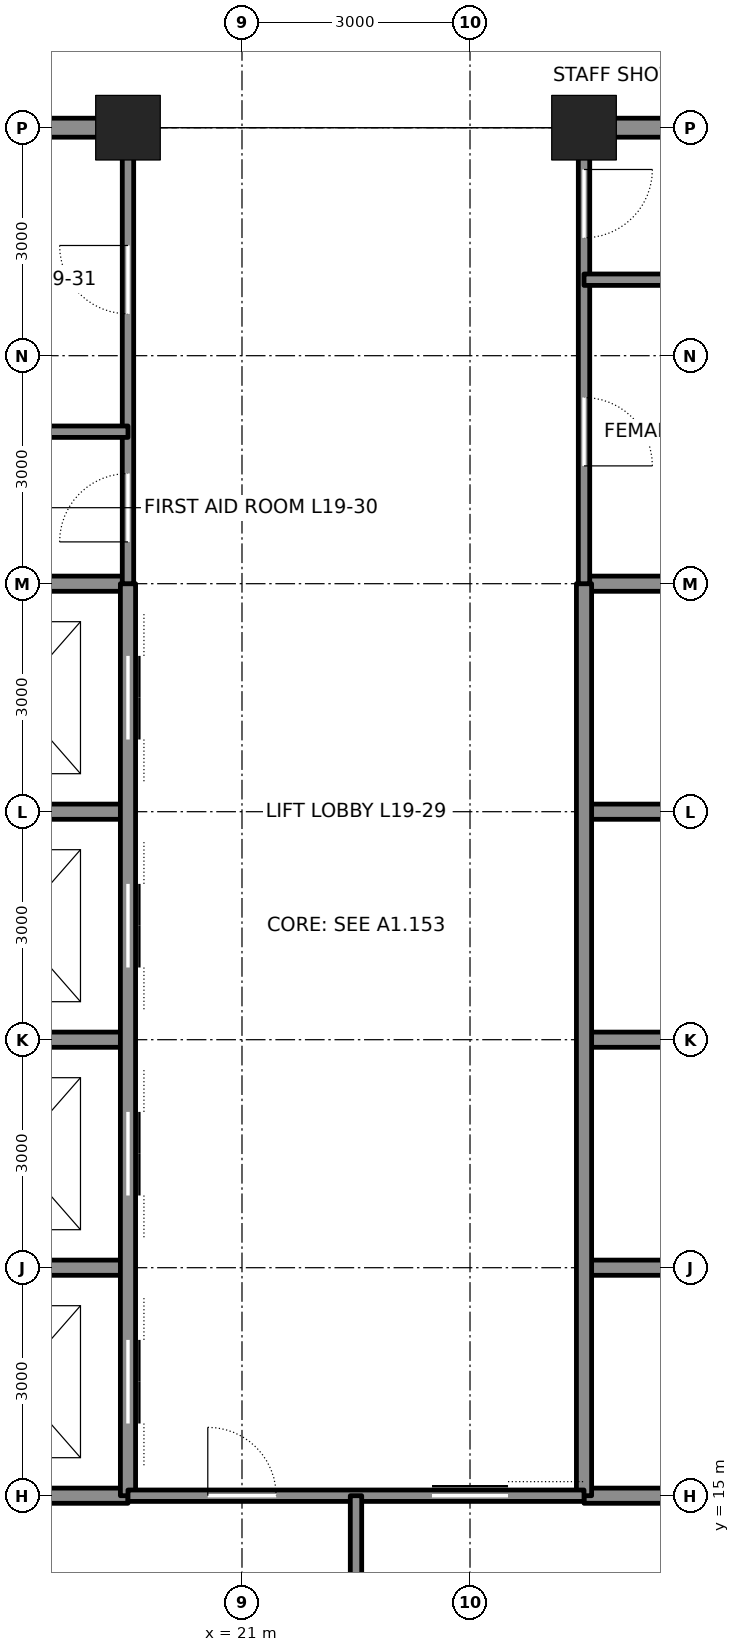
"""IFC4 building model, lengths in metres.
Left out: names, types, materials, properties, quantities, classifications, styles, units other than length and angle.
Written with IfcOpenShell. Run it as: python <this file> out.ifc"""

import sys

from ifc_helpers import new_model, si_unit, direction, frame, frame_2d, origin, origin_2d, place, context, subcontext, project, spatial, rectangle, hollow_rectangle, extrude, element, fill, save


model = new_model("IFC4")
c1 = context("Model", 3, precision=1e-05, world=origin(), true_north=direction((0.0, 1.0)))
c2 = subcontext(c1, "Body", "Model", "MODEL_VIEW")
j1 = project(units=[si_unit("LENGTHUNIT", "METRE"), si_unit("PLANEANGLEUNIT", "RADIAN")], contexts=[c1])
p1 = place(None, origin())
s1 = spatial("IfcSite", under=j1, at=p1, CompositionType="ELEMENT")
p2 = place(p1, origin())
s2 = spatial("IfcBuilding", under=s1, at=p2, CompositionType="ELEMENT")
p3 = place(p2, frame((0.0, 0.0, 91.8)))
s3 = spatial("IfcBuildingStorey", under=s2, at=p3, CompositionType="ELEMENT", Elevation=91.8)
for number, where, z_axis, x_axis in (
    (1, (19.5, 33.0, 0.0), (0.0, 0.0, 1.0), (1.0, 0.0, 0.0)),
    (2, (25.5, 33.0, 0.0), (0.0, 0.0, 1.0), (1.0, 0.0, 0.0)),
):
    element("IfcColumn", number, at=place(p3, frame(where, z_axis=z_axis, x_axis=x_axis)), inside=s3, PredefinedType="COLUMN", context=c2, shape_type="SweptSolid", body=[
        extrude(hollow_rectangle(XDim=0.85, YDim=0.85, WallThickness=0.085, at=origin_2d()), origin(), (0.0, 0.0, 1.0), 4.5),
    ])
for number, where, z_axis, x_axis in (
    (3, (12.0, 15.0, 0.0), (0.0, 0.0, 1.0), (1.0, 0.0, 0.0)),
    (4, (25.5, 15.0, 0.0), (0.0, 0.0, 1.0), (1.0, 0.0, 0.0)),
):
    element("IfcWall", number, at=place(p3, frame(where, z_axis=z_axis, x_axis=x_axis)), inside=s3, PredefinedType="SOLIDWALL", context=c2, shape_type="SweptSolid", body=[
        extrude(rectangle(XDim=7.5, YDim=0.2, at=frame_2d((3.75, 0.0))), origin(), (0.0, 0.0, 1.0), 4.34),
    ])
for number, where, z_axis, x_axis in (
    (5, (16.75, 24.0, 0.0), (0.0, 0.0, 1.0), (1.0, 0.0, 0.0)),
    (6, (25.5, 24.0, 0.0), (0.0, 0.0, 1.0), (1.0, 0.0, 0.0)),
):
    element("IfcWall", number, at=place(p3, frame(where, z_axis=z_axis, x_axis=x_axis)), inside=s3, PredefinedType="SOLIDWALL", context=c2, shape_type="SweptSolid", body=[
        extrude(rectangle(XDim=2.75, YDim=0.2, at=frame_2d((1.375, 0.0))), origin(), (0.0, 0.0, 1.0), 3.39),
    ])
p4 = place(p3, frame((12.0, 27.0, 0.0), z_axis=(0.0, 0.0, 1.0), x_axis=(1.0, 0.0, 0.0)))
e7 = element("IfcWall", 7, at=p4, inside=s3, PredefinedType="SOLIDWALL", context=c2, shape_type="SweptSolid", body=[
    extrude(rectangle(XDim=7.5, YDim=0.2, at=frame_2d((3.75, 0.0))), origin(), (0.0, 0.0, 1.0), 4.34),
])
p5 = place(p4, frame((1.65, 0.0, 0.0)))
e8 = element("IfcOpeningElement", 8, at=p5, cuts=e7, PredefinedType="OPENING", context=c2, shape_type="SweptSolid", body=[
    extrude(rectangle(XDim=1.2, YDim=2.1, at=frame_2d((0.6, 1.05))), frame((0.0, 0.11, 0.0), z_axis=(0.0, -1.0, 0.0), x_axis=(1.0, 0.0, 0.0)), (0.0, 0.0, 1.0), 0.22),
])
p6 = place(p3, frame((25.5, 27.0, 0.0), z_axis=(0.0, 0.0, 1.0), x_axis=(1.0, 0.0, 0.0)))
e9 = element("IfcWall", 9, at=p6, inside=s3, PredefinedType="SOLIDWALL", context=c2, shape_type="SweptSolid", body=[
    extrude(rectangle(XDim=3.0, YDim=0.2, at=frame_2d((1.5, 0.0))), origin(), (0.0, 0.0, 1.0), 4.34),
])
for number, where, z_axis, x_axis in (
    (10, (16.75, 33.0, 0.0), (0.0, 0.0, 1.0), (1.0, 0.0, 0.0)),
    (11, (25.75, 33.0, 0.0), (0.0, 0.0, 1.0), (1.0, 0.0, 0.0)),
):
    element("IfcWall", number, at=place(p3, frame(where, z_axis=z_axis, x_axis=x_axis)), inside=s3, PredefinedType="SOLIDWALL", context=c2, shape_type="SweptSolid", body=[
        extrude(rectangle(XDim=2.5, YDim=0.25, at=frame_2d((1.25, 0.0))), origin(), (0.0, 0.0, 1.0), 3.481),
    ])
p7 = place(p3, frame((16.5, 18.0, 0.0), z_axis=(0.0, 0.0, 1.0), x_axis=(1.0, 0.0, 0.0)))
e12 = element("IfcWall", 12, at=p7, inside=s3, PredefinedType="SOLIDWALL", context=c2, shape_type="SweptSolid", body=[
    extrude(rectangle(XDim=3.0, YDim=0.2, at=frame_2d((1.5, 0.0))), origin(), (0.0, 0.0, 1.0), 4.34),
])
p8 = place(p3, frame((25.5, 18.0, 0.0), z_axis=(0.0, 0.0, 1.0), x_axis=(1.0, 0.0, 0.0)))
e13 = element("IfcWall", 13, at=p8, inside=s3, PredefinedType="SOLIDWALL", context=c2, shape_type="SweptSolid", body=[
    extrude(rectangle(XDim=7.5, YDim=0.2, at=frame_2d((3.75, 0.0))), origin(), (0.0, 0.0, 1.0), 4.34),
])
p9 = place(p8, frame((4.65, 0.0, 0.0)))
e14 = element("IfcOpeningElement", 14, at=p9, cuts=e13, PredefinedType="OPENING", context=c2, shape_type="SweptSolid", body=[
    extrude(rectangle(XDim=1.2, YDim=2.1, at=frame_2d((0.6, 1.05))), frame((0.0, 0.11, 0.0), z_axis=(0.0, -1.0, 0.0), x_axis=(1.0, 0.0, 0.0)), (0.0, 0.0, 1.0), 0.22),
])
for number, where, z_axis, x_axis in (
    (15, (16.75, 21.0, 0.0), (0.0, 0.0, 1.0), (1.0, 0.0, 0.0)),
    (16, (25.5, 21.0, 0.0), (0.0, 0.0, 1.0), (1.0, 0.0, 0.0)),
):
    element("IfcWall", number, at=place(p3, frame(where, z_axis=z_axis, x_axis=x_axis)), inside=s3, PredefinedType="SOLIDWALL", context=c2, shape_type="SweptSolid", body=[
        extrude(rectangle(XDim=2.75, YDim=0.2, at=frame_2d((1.375, 0.0))), origin(), (0.0, 0.0, 1.0), 3.39),
    ])
p10 = place(p3, frame((19.5, 15.0, 0.0), z_axis=(0.0, 0.0, 1.0), x_axis=(0.0, 1.0, 0.0)))
e17 = element("IfcWall", 17, at=p10, inside=s3, PredefinedType="SOLIDWALL", context=c2, shape_type="SweptSolid", body=[
    extrude(rectangle(XDim=12.0, YDim=0.2, at=frame_2d((6.0, 0.0))), origin(), (0.0, 0.0, 1.0), 3.365),
])
p11 = place(p10, frame((0.95, 0.0, 0.0)))
e18 = element("IfcOpeningElement", 18, at=p11, cuts=e17, PredefinedType="OPENING", context=c2, shape_type="SweptSolid", body=[
    extrude(rectangle(XDim=1.1, YDim=2.1, at=frame_2d((0.55, 1.05))), frame((0.0, 0.11, 0.0), z_axis=(0.0, -1.0, 0.0), x_axis=(1.0, 0.0, 0.0)), (0.0, 0.0, 1.0), 0.22),
])
p12 = place(p10, frame((3.95, 0.0, 0.0)))
e19 = element("IfcOpeningElement", 19, at=p12, cuts=e17, PredefinedType="OPENING", context=c2, shape_type="SweptSolid", body=[
    extrude(rectangle(XDim=1.1, YDim=2.1, at=frame_2d((0.55, 1.05))), frame((0.0, 0.11, 0.0), z_axis=(0.0, -1.0, 0.0), x_axis=(1.0, 0.0, 0.0)), (0.0, 0.0, 1.0), 0.22),
])
p13 = place(p10, frame((6.95, 0.0, 0.0)))
e20 = element("IfcOpeningElement", 20, at=p13, cuts=e17, PredefinedType="OPENING", context=c2, shape_type="SweptSolid", body=[
    extrude(rectangle(XDim=1.1, YDim=2.1, at=frame_2d((0.55, 1.05))), frame((0.0, 0.11, 0.0), z_axis=(0.0, -1.0, 0.0), x_axis=(1.0, 0.0, 0.0)), (0.0, 0.0, 1.0), 0.22),
])
p14 = place(p10, frame((9.95, 0.0, 0.0)))
e21 = element("IfcOpeningElement", 21, at=p14, cuts=e17, PredefinedType="OPENING", context=c2, shape_type="SweptSolid", body=[
    extrude(rectangle(XDim=1.1, YDim=2.1, at=frame_2d((0.55, 1.05))), frame((0.0, 0.11, 0.0), z_axis=(0.0, -1.0, 0.0), x_axis=(1.0, 0.0, 0.0)), (0.0, 0.0, 1.0), 0.22),
])
p15 = place(p3, frame((19.5, 27.0, 0.0), z_axis=(0.0, 0.0, 1.0), x_axis=(0.0, 1.0, 0.0)))
e22 = element("IfcWall", 22, at=p15, inside=s3, PredefinedType="PARTITIONING", context=c2, shape_type="SweptSolid", body=[
    extrude(rectangle(XDim=5.75, YDim=0.15, at=frame_2d((2.875, 0.0))), origin(), (0.0, 0.0, 1.0), 3.365),
])
p16 = place(p15, frame((0.55, 0.0, 0.0)))
e23 = element("IfcOpeningElement", 23, at=p16, cuts=e22, PredefinedType="OPENING", context=c2, shape_type="SweptSolid", body=[
    extrude(rectangle(XDim=0.9, YDim=2.1, at=frame_2d((0.45, 1.05))), frame((0.0, 0.085, 0.0), z_axis=(0.0, -1.0, 0.0), x_axis=(1.0, 0.0, 0.0)), (0.0, 0.0, 1.0), 0.17),
])
p17 = place(p15, frame((3.55, 0.0, 0.0)))
e24 = element("IfcOpeningElement", 24, at=p17, cuts=e22, PredefinedType="OPENING", context=c2, shape_type="SweptSolid", body=[
    extrude(rectangle(XDim=0.9, YDim=2.1, at=frame_2d((0.45, 1.05))), frame((0.0, 0.085, 0.0), z_axis=(0.0, -1.0, 0.0), x_axis=(1.0, 0.0, 0.0)), (0.0, 0.0, 1.0), 0.17),
])
p18 = place(p3, frame((25.5, 15.0, 0.0), z_axis=(0.0, 0.0, 1.0), x_axis=(0.0, 1.0, 0.0)))
e25 = element("IfcWall", 25, at=p18, inside=s3, PredefinedType="SOLIDWALL", context=c2, shape_type="SweptSolid", body=[
    extrude(rectangle(XDim=12.0, YDim=0.2, at=frame_2d((6.0, 0.0))), origin(), (0.0, 0.0, 1.0), 3.365),
])
p19 = place(p3, frame((25.5, 27.0, 0.0), z_axis=(0.0, 0.0, 1.0), x_axis=(0.0, 1.0, 0.0)))
e26 = element("IfcWall", 26, at=p19, inside=s3, PredefinedType="PARTITIONING", context=c2, shape_type="SweptSolid", body=[
    extrude(rectangle(XDim=5.75, YDim=0.15, at=frame_2d((2.875, 0.0))), origin(), (0.0, 0.0, 1.0), 3.365),
])
p20 = place(p19, frame((1.55, 0.0, 0.0)))
e27 = element("IfcOpeningElement", 27, at=p20, cuts=e26, PredefinedType="OPENING", context=c2, shape_type="SweptSolid", body=[
    extrude(rectangle(XDim=0.9, YDim=2.1, at=frame_2d((0.45, 1.05))), frame((0.0, 0.085, 0.0), z_axis=(0.0, -1.0, 0.0), x_axis=(1.0, 0.0, 0.0)), (0.0, 0.0, 1.0), 0.17),
])
p21 = place(p19, frame((4.55, 0.0, 0.0)))
e28 = element("IfcOpeningElement", 28, at=p21, cuts=e26, PredefinedType="OPENING", context=c2, shape_type="SweptSolid", body=[
    extrude(rectangle(XDim=0.9, YDim=2.1, at=frame_2d((0.45, 1.05))), frame((0.0, 0.085, 0.0), z_axis=(0.0, -1.0, 0.0), x_axis=(1.0, 0.0, 0.0)), (0.0, 0.0, 1.0), 0.17),
])
p22 = place(p3, frame((19.5, 15.0, 0.0), z_axis=(0.0, 0.0, 1.0), x_axis=(1.0, 0.0, 0.0)))
e29 = element("IfcWall", 29, at=p22, inside=s3, PredefinedType="PARTITIONING", context=c2, shape_type="SweptSolid", body=[
    extrude(rectangle(XDim=6.0, YDim=0.15, at=frame_2d((3.0, 0.0))), origin(), (0.0, 0.0, 1.0), 4.34),
])
p23 = place(p22, frame((4.0, 0.0, 0.0)))
e30 = element("IfcOpeningElement", 30, at=p23, cuts=e29, PredefinedType="OPENING", context=c2, shape_type="SweptSolid", body=[
    extrude(rectangle(XDim=1.0, YDim=2.1, at=frame_2d((0.5, 1.05))), frame((0.0, 0.085, 0.0), z_axis=(0.0, -1.0, 0.0), x_axis=(1.0, 0.0, 0.0)), (0.0, 0.0, 1.0), 0.17),
])
p24 = place(p22, frame((1.05, 0.0, 0.0)))
e31 = element("IfcOpeningElement", 31, at=p24, cuts=e29, PredefinedType="OPENING", context=c2, shape_type="SweptSolid", body=[
    extrude(rectangle(XDim=0.9, YDim=2.1, at=frame_2d((0.45, 1.05))), frame((0.0, 0.085, 0.0), z_axis=(0.0, -1.0, 0.0), x_axis=(1.0, 0.0, 0.0)), (0.0, 0.0, 1.0), 0.17),
])
for number, where, z_axis, x_axis in (
    (32, (22.5, 15.0, 0.0), (0.0, 0.0, 1.0), (0.0, -1.0, 0.0)),
    (33, (16.5, 29.0, 0.0), (0.0, 0.0, 1.0), (1.0, 0.0, 0.0)),
    (34, (25.5, 31.0, 0.0), (0.0, 0.0, 1.0), (1.0, 0.0, 0.0)),
):
    element("IfcWall", number, at=place(p3, frame(where, z_axis=z_axis, x_axis=x_axis)), inside=s3, PredefinedType="PARTITIONING", context=c2, shape_type="SweptSolid", body=[
        extrude(rectangle(XDim=3.0, YDim=0.15, at=frame_2d((1.5, 0.0))), origin(), (0.0, 0.0, 1.0), 4.34),
    ])
p25 = place(p16, origin())
e35 = element("IfcDoor", 35, at=p25, inside=s3, OperationType="SINGLE_SWING_LEFT", PredefinedType="DOOR", context=c2, shape_type="SweptSolid", body=[
    extrude(rectangle(XDim=0.9, YDim=2.1, at=frame_2d((0.45, 1.05))), frame((0.0, 0.025, 0.0), z_axis=(0.0, -1.0, 0.0), x_axis=(1.0, 0.0, 0.0)), (0.0, 0.0, 1.0), 0.05),
])
fill(e23, e35)
p26 = place(p17, origin())
e36 = element("IfcDoor", 36, at=p26, inside=s3, OperationType="SINGLE_SWING_RIGHT", PredefinedType="DOOR", context=c2, shape_type="SweptSolid", body=[
    extrude(rectangle(XDim=0.9, YDim=2.1, at=frame_2d((0.45, 1.05))), frame((0.0, 0.025, 0.0), z_axis=(0.0, -1.0, 0.0), x_axis=(1.0, 0.0, 0.0)), (0.0, 0.0, 1.0), 0.05),
])
fill(e24, e36)
p27 = place(p20, frame((0.9, 0.0, 0.0), z_axis=(0.0, 0.0, 1.0), x_axis=(-1.0, 0.0, 0.0)))
e37 = element("IfcDoor", 37, at=p27, inside=s3, OperationType="SINGLE_SWING_RIGHT", PredefinedType="DOOR", context=c2, shape_type="SweptSolid", body=[
    extrude(rectangle(XDim=0.9, YDim=2.1, at=frame_2d((0.45, 1.05))), frame((0.0, 0.025, 0.0), z_axis=(0.0, -1.0, 0.0), x_axis=(1.0, 0.0, 0.0)), (0.0, 0.0, 1.0), 0.05),
])
fill(e27, e37)
p28 = place(p21, frame((0.9, 0.0, 0.0), z_axis=(0.0, 0.0, 1.0), x_axis=(-1.0, 0.0, 0.0)))
e38 = element("IfcDoor", 38, at=p28, inside=s3, OperationType="SINGLE_SWING_LEFT", PredefinedType="DOOR", context=c2, shape_type="SweptSolid", body=[
    extrude(rectangle(XDim=0.9, YDim=2.1, at=frame_2d((0.45, 1.05))), frame((0.0, 0.025, 0.0), z_axis=(0.0, -1.0, 0.0), x_axis=(1.0, 0.0, 0.0)), (0.0, 0.0, 1.0), 0.05),
])
fill(e28, e38)
p29 = place(p23, origin())
e39 = element("IfcDoor", 39, at=p29, inside=s3, OperationType="SLIDING_TO_LEFT", PredefinedType="DOOR", context=c2, shape_type="SweptSolid", body=[
    extrude(rectangle(XDim=1.0, YDim=2.1, at=frame_2d((0.5, 1.05))), frame((0.0, 0.025, 0.0), z_axis=(0.0, -1.0, 0.0), x_axis=(1.0, 0.0, 0.0)), (0.0, 0.0, 1.0), 0.05),
])
fill(e30, e39)
p30 = place(p24, origin())
e40 = element("IfcDoor", 40, at=p30, inside=s3, OperationType="SINGLE_SWING_LEFT", PredefinedType="DOOR", context=c2, shape_type="SweptSolid", body=[
    extrude(rectangle(XDim=0.9, YDim=2.1, at=frame_2d((0.45, 1.05))), frame((0.0, 0.025, 0.0), z_axis=(0.0, -1.0, 0.0), x_axis=(1.0, 0.0, 0.0)), (0.0, 0.0, 1.0), 0.05),
])
fill(e31, e40)
p31 = place(p11, origin())
e41 = element("IfcDoor", 41, at=p31, inside=s3, OperationType="DOUBLE_DOOR_SLIDING", PredefinedType="DOOR", context=c2, shape_type="SweptSolid", body=[
    extrude(rectangle(XDim=1.1, YDim=2.1, at=frame_2d((0.55, 1.05))), frame((0.0, 0.025, 0.0), z_axis=(0.0, -1.0, 0.0), x_axis=(1.0, 0.0, 0.0)), (0.0, 0.0, 1.0), 0.05),
])
fill(e18, e41)
p32 = place(p12, origin())
e42 = element("IfcDoor", 42, at=p32, inside=s3, OperationType="DOUBLE_DOOR_SLIDING", PredefinedType="DOOR", context=c2, shape_type="SweptSolid", body=[
    extrude(rectangle(XDim=1.1, YDim=2.1, at=frame_2d((0.55, 1.05))), frame((0.0, 0.025, 0.0), z_axis=(0.0, -1.0, 0.0), x_axis=(1.0, 0.0, 0.0)), (0.0, 0.0, 1.0), 0.05),
])
fill(e19, e42)
p33 = place(p13, origin())
e43 = element("IfcDoor", 43, at=p33, inside=s3, OperationType="DOUBLE_DOOR_SLIDING", PredefinedType="DOOR", context=c2, shape_type="SweptSolid", body=[
    extrude(rectangle(XDim=1.1, YDim=2.1, at=frame_2d((0.55, 1.05))), frame((0.0, 0.025, 0.0), z_axis=(0.0, -1.0, 0.0), x_axis=(1.0, 0.0, 0.0)), (0.0, 0.0, 1.0), 0.05),
])
fill(e20, e43)
p34 = place(p14, origin())
e44 = element("IfcDoor", 44, at=p34, inside=s3, OperationType="DOUBLE_DOOR_SLIDING", PredefinedType="DOOR", context=c2, shape_type="SweptSolid", body=[
    extrude(rectangle(XDim=1.1, YDim=2.1, at=frame_2d((0.55, 1.05))), frame((0.0, 0.025, 0.0), z_axis=(0.0, -1.0, 0.0), x_axis=(1.0, 0.0, 0.0)), (0.0, 0.0, 1.0), 0.05),
])
fill(e21, e44)
save(model, sys.argv[1])
